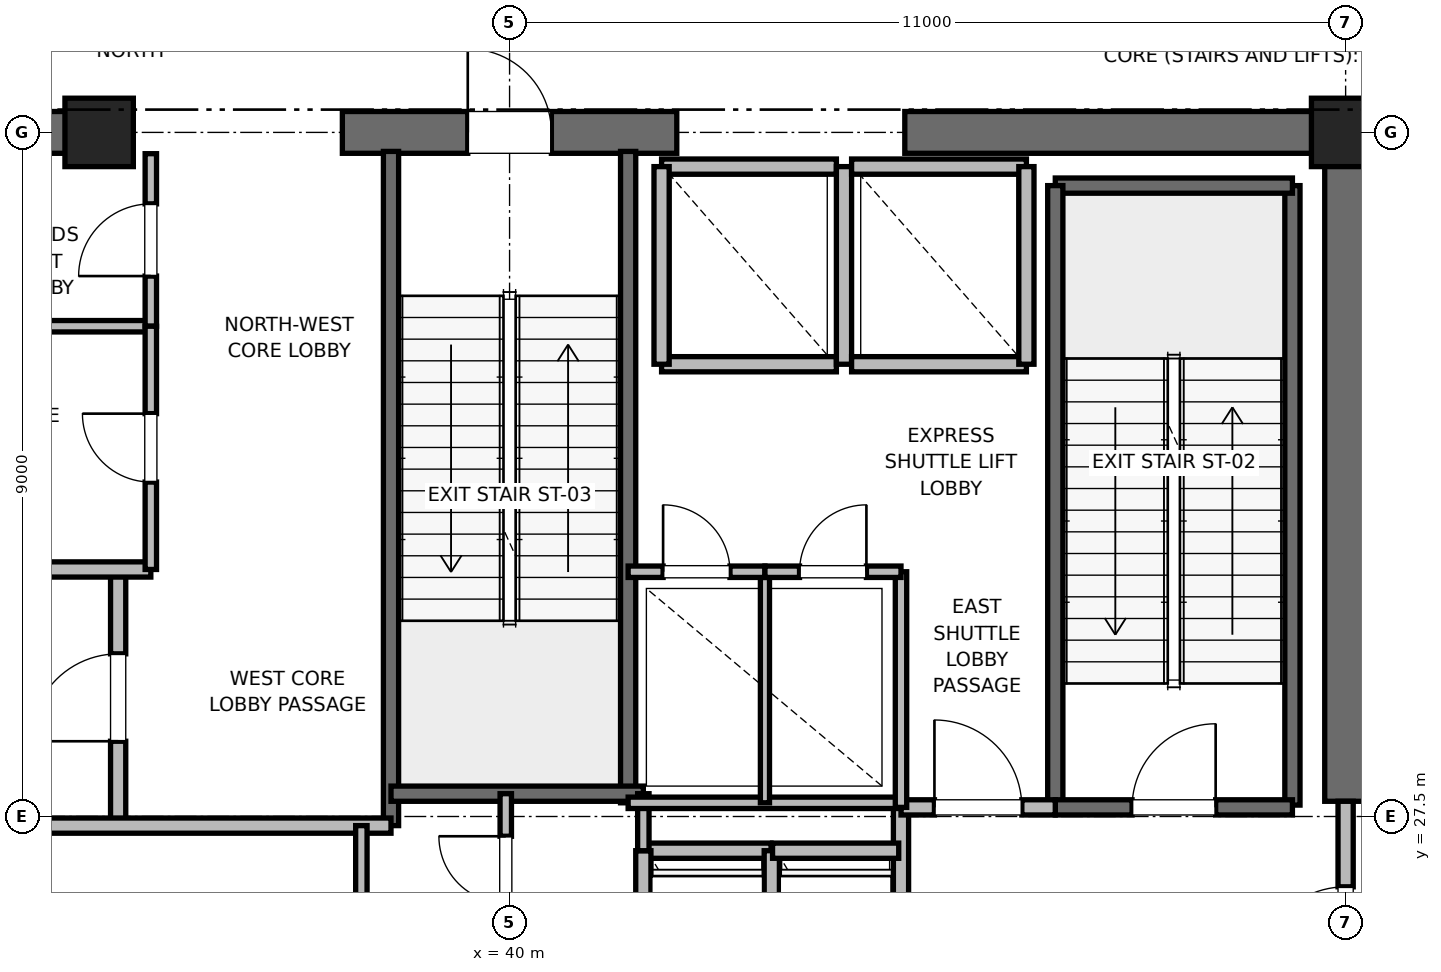
"""IFC4 building model, lengths in metres.
Left out: names, types, materials, properties, quantities, classifications, styles, units other than length and angle.
Written with IfcOpenShell. Run it as: python <this file> out.ifc"""

import sys

from ifc_helpers import new_model, si_unit, direction, frame, frame_2d, origin, origin_2d, place, context, subcontext, project, spatial, rectangle, extrude, element, fill, save


model = new_model("IFC4")
c1 = context("Model", 3, precision=1e-05, world=origin(), true_north=direction((0.0, 1.0)))
c2 = subcontext(c1, "Body", "Model", "MODEL_VIEW")
j1 = project(units=[si_unit("LENGTHUNIT", "METRE"), si_unit("PLANEANGLEUNIT", "RADIAN")], contexts=[c1])
p1 = place(None, origin())
s1 = spatial("IfcSite", under=j1, at=p1, CompositionType="ELEMENT")
p2 = place(p1, origin())
s2 = spatial("IfcBuilding", under=s1, at=p2, CompositionType="ELEMENT")
p3 = place(p2, frame((0.0, 0.0, 189.4)))
s3 = spatial("IfcBuildingStorey", under=s2, at=p3, CompositionType="ELEMENT", Elevation=189.4)
for number, where, z_axis, x_axis in (
    (1, (51.0, 36.5, 0.0), (0.0, 0.0, 1.0), (1.0, 0.0, 0.0)),
    (2, (34.6, 36.5, 0.0), (0.0, 0.0, 1.0), (1.0, 0.0, 0.0)),
):
    element("IfcColumn", number, at=place(p3, frame(where, z_axis=z_axis, x_axis=x_axis)), inside=s3, PredefinedType="PILASTER", context=c2, shape_type="SweptSolid", body=[
        extrude(rectangle(XDim=0.9, YDim=0.9, at=origin_2d()), origin(), (0.0, 0.0, 1.0), 5.4),
    ])
p4 = place(p3, frame((29.0, 36.5, 0.0), z_axis=(0.0, 0.0, 1.0), x_axis=(1.0, 0.0, 0.0)))
e3 = element("IfcWall", 3, at=p4, inside=s3, PredefinedType="SHEAR", context=c2, shape_type="SweptSolid", body=[
    extrude(rectangle(XDim=5.8, YDim=0.55, at=frame_2d((2.9, 0.0))), origin(), (0.0, 0.0, 1.0), 5.1),
])
p5 = place(p3, frame((37.8, 36.5, 0.0), z_axis=(0.0, 0.0, 1.0), x_axis=(1.0, 0.0, 0.0)))
e4 = element("IfcWall", 4, at=p5, inside=s3, PredefinedType="SHEAR", context=c2, shape_type="SweptSolid", body=[
    extrude(rectangle(XDim=4.4, YDim=0.55, at=frame_2d((2.2, 0.0))), origin(), (0.0, 0.0, 1.0), 5.1),
])
p6 = place(p5, frame((1.65, 0.0, 0.0)))
e5 = element("IfcOpeningElement", 5, at=p6, cuts=e4, PredefinedType="OPENING", context=c2, shape_type="SweptSolid", body=[
    extrude(rectangle(XDim=1.1, YDim=2.15, at=frame_2d((0.55, 1.075))), frame((0.0, 0.275, 0.0), z_axis=(0.0, -1.0, 0.0), x_axis=(1.0, 0.0, 0.0)), (0.0, 0.0, 1.0), 0.55),
])
p7 = place(p3, frame((45.2, 36.5, 0.0), z_axis=(0.0, 0.0, 1.0), x_axis=(1.0, 0.0, 0.0)))
e6 = element("IfcWall", 6, at=p7, inside=s3, PredefinedType="SHEAR", context=c2, shape_type="SweptSolid", body=[
    extrude(rectangle(XDim=5.8, YDim=0.55, at=frame_2d((2.9, 0.0))), origin(), (0.0, 0.0, 1.0), 5.1),
])
p8 = place(p3, frame((51.0, 27.7, 0.0), z_axis=(0.0, 0.0, 1.0), x_axis=(0.0, 1.0, 0.0)))
e7 = element("IfcWall", 7, at=p8, inside=s3, PredefinedType="SHEAR", context=c2, shape_type="SweptSolid", body=[
    extrude(rectangle(XDim=8.8, YDim=0.55, at=frame_2d((4.4, 0.0))), origin(), (0.0, 0.0, 1.0), 5.1),
])
p9 = place(p3, frame((50.3, 27.65, 0.0), z_axis=(0.0, 0.0, 1.0), x_axis=(0.0, 1.0, 0.0)))
e8 = element("IfcWall", 8, at=p9, inside=s3, PredefinedType="SOLIDWALL", context=c2, shape_type="SweptSolid", body=[
    extrude(rectangle(XDim=8.15, YDim=0.2, at=frame_2d((4.075, 0.0))), origin(), (0.0, 0.0, 1.0), 5.1),
])
p10 = place(p3, frame((47.18, 35.8, 0.0), z_axis=(0.0, 0.0, 1.0), x_axis=(1.0, 0.0, 0.0)))
e9 = element("IfcWall", 9, at=p10, inside=s3, PredefinedType="SOLIDWALL", context=c2, shape_type="SweptSolid", body=[
    extrude(rectangle(XDim=3.12, YDim=0.2, at=frame_2d((1.56, 0.0))), origin(), (0.0, 0.0, 1.0), 5.1),
])
p11 = place(p3, frame((47.18, 27.62, 0.0), z_axis=(0.0, 0.0, 1.0), x_axis=(0.0, 1.0, 0.0)))
e10 = element("IfcWall", 10, at=p11, inside=s3, PredefinedType="SOLIDWALL", context=c2, shape_type="SweptSolid", body=[
    extrude(rectangle(XDim=8.18, YDim=0.2, at=frame_2d((4.09, 0.0))), origin(), (0.0, 0.0, 1.0), 5.1),
])
p12 = place(p3, frame((47.18, 27.62, 0.0), z_axis=(0.0, 0.0, 1.0), x_axis=(1.0, 0.0, 0.0)))
e11 = element("IfcWall", 11, at=p12, inside=s3, PredefinedType="SOLIDWALL", context=c2, shape_type="SweptSolid", body=[
    extrude(rectangle(XDim=3.12, YDim=0.2, at=frame_2d((1.56, 0.0))), origin(), (0.0, 0.0, 1.0), 5.1),
])
p13 = place(p12, frame((1.01, 0.0, 0.0)))
e12 = element("IfcOpeningElement", 12, at=p13, cuts=e11, PredefinedType="OPENING", context=c2, shape_type="SweptSolid", body=[
    extrude(rectangle(XDim=1.1, YDim=2.15, at=frame_2d((0.55, 1.075))), frame((0.0, 0.1, 0.0), z_axis=(0.0, -1.0, 0.0), x_axis=(1.0, 0.0, 0.0)), (0.0, 0.0, 1.0), 0.2),
])
p14 = place(p3, frame((38.44, 27.38, 0.0), z_axis=(0.0, 0.0, 1.0), x_axis=(0.0, 1.0, 0.0)))
e13 = element("IfcWall", 13, at=p14, inside=s3, PredefinedType="SOLIDWALL", context=c2, shape_type="SweptSolid", body=[
    extrude(rectangle(XDim=8.87, YDim=0.2, at=frame_2d((4.435, 0.0))), origin(), (0.0, 0.0, 1.0), 5.1),
])
p15 = place(p3, frame((41.56, 27.68, 0.0), z_axis=(0.0, 0.0, 1.0), x_axis=(0.0, 1.0, 0.0)))
e14 = element("IfcWall", 14, at=p15, inside=s3, PredefinedType="SOLIDWALL", context=c2, shape_type="SweptSolid", body=[
    extrude(rectangle(XDim=8.57, YDim=0.2, at=frame_2d((4.285, 0.0))), origin(), (0.0, 0.0, 1.0), 5.1),
])
p16 = place(p3, frame((38.44, 27.8, 0.0), z_axis=(0.0, 0.0, 1.0), x_axis=(1.0, 0.0, 0.0)))
e15 = element("IfcWall", 15, at=p16, inside=s3, PredefinedType="SOLIDWALL", context=c2, shape_type="SweptSolid", body=[
    extrude(rectangle(XDim=3.32, YDim=0.2, at=frame_2d((1.66, 0.0))), origin(), (0.0, 0.0, 1.0), 5.1),
])
p17 = place(p3, frame((34.85, 27.38, 0.0), z_axis=(0.0, 0.0, 1.0), x_axis=(0.0, 1.0, 0.0)))
e16 = element("IfcWall", 16, at=p17, inside=s3, PredefinedType="PARTITIONING", context=c2, shape_type="SweptSolid", body=[
    extrude(rectangle(XDim=3.37, YDim=0.2, at=frame_2d((1.685, 0.0))), origin(), (0.0, 0.0, 1.0), 5.1),
])
p18 = place(p17, frame((1.11, 0.0, 0.0)))
e17 = element("IfcOpeningElement", 17, at=p18, cuts=e16, PredefinedType="OPENING", context=c2, shape_type="SweptSolid", body=[
    extrude(rectangle(XDim=1.15, YDim=2.2, at=frame_2d((0.575, 1.1))), frame((0.0, 0.1, 0.0), z_axis=(0.0, -1.0, 0.0), x_axis=(1.0, 0.0, 0.0)), (0.0, 0.0, 1.0), 0.2),
])
p19 = place(p3, frame((32.82, 27.38, 0.0), z_axis=(0.0, 0.0, 1.0), x_axis=(1.0, 0.0, 0.0)))
e18 = element("IfcWall", 18, at=p19, inside=s3, PredefinedType="PARTITIONING", context=c2, shape_type="SweptSolid", body=[
    extrude(rectangle(XDim=5.62, YDim=0.2, at=frame_2d((2.81, 0.0))), origin(), (0.0, 0.0, 1.0), 5.1),
])
p20 = place(p3, frame((32.15, 30.75, 0.0), z_axis=(0.0, 0.0, 1.0), x_axis=(1.0, 0.0, 0.0)))
e19 = element("IfcWall", 19, at=p20, inside=s3, PredefinedType="PARTITIONING", context=c2, shape_type="SweptSolid", body=[
    extrude(rectangle(XDim=3.13, YDim=0.2, at=frame_2d((1.565, 0.0))), origin(), (0.0, 0.0, 1.0), 5.1),
])
p21 = place(p3, frame((45.15, 24.25, 0.0), z_axis=(0.0, 0.0, 1.0), x_axis=(0.0, 1.0, 0.0)))
e20 = element("IfcWall", 20, at=p21, inside=s3, PredefinedType="PARTITIONING", context=c2, shape_type="SweptSolid", body=[
    extrude(rectangle(XDim=3.37, YDim=0.2, at=frame_2d((1.685, 0.0))), origin(), (0.0, 0.0, 1.0), 5.1),
])
p22 = place(p3, frame((45.15, 27.62, 0.0), z_axis=(0.0, 0.0, 1.0), x_axis=(1.0, 0.0, 0.0)))
e21 = element("IfcWall", 21, at=p22, inside=s3, PredefinedType="PARTITIONING", context=c2, shape_type="SweptSolid", body=[
    extrude(rectangle(XDim=2.03, YDim=0.2, at=frame_2d((1.015, 0.0))), origin(), (0.0, 0.0, 1.0), 5.1),
])
p23 = place(p22, frame((0.44, 0.0, 0.0)))
e22 = element("IfcOpeningElement", 22, at=p23, cuts=e21, PredefinedType="OPENING", context=c2, shape_type="SweptSolid", body=[
    extrude(rectangle(XDim=1.15, YDim=2.2, at=frame_2d((0.575, 1.1))), frame((0.0, 0.1, 0.0), z_axis=(0.0, -1.0, 0.0), x_axis=(1.0, 0.0, 0.0)), (0.0, 0.0, 1.0), 0.2),
])
p24 = place(p3, frame((51.0, 24.3, 0.0), z_axis=(0.0, 0.0, 1.0), x_axis=(0.0, 1.0, 0.0)))
e23 = element("IfcWall", 23, at=p24, inside=s3, PredefinedType="PARTITIONING", context=c2, shape_type="SweptSolid", body=[
    extrude(rectangle(XDim=3.4, YDim=0.2, at=frame_2d((1.7, 0.0))), origin(), (0.0, 0.0, 1.0), 4.08),
])
p25 = place(p24, frame((1.125, 0.0, 0.0)))
e24 = element("IfcOpeningElement", 24, at=p25, cuts=e23, PredefinedType="OPENING", context=c2, shape_type="SweptSolid", body=[
    extrude(rectangle(XDim=1.15, YDim=2.2, at=frame_2d((0.575, 1.1))), frame((0.0, 0.1, 0.0), z_axis=(0.0, -1.0, 0.0), x_axis=(1.0, 0.0, 0.0)), (0.0, 0.0, 1.0), 0.2),
])
p26 = place(p3, frame((43.44, 27.05, 0.0), z_axis=(0.0, 0.0, 1.0), x_axis=(-1.0, 0.0, 0.0)))
e25 = element("IfcWall", 25, at=p26, inside=s3, PredefinedType="SOLIDWALL", context=c2, shape_type="SweptSolid", body=[
    extrude(rectangle(XDim=1.68, YDim=0.2, at=frame_2d((0.84, 0.0))), origin(), (0.0, 0.0, 1.0), 5.1),
])
for number, where, z_axis, x_axis in (
    (26, (41.76, 27.05, 0.0), (0.0, 0.0, 1.0), (0.0, -1.0, 0.0)),
    (27, (43.45, 24.45, 0.0), (0.0, 0.0, 1.0), (0.0, 1.0, 0.0)),
):
    element("IfcWall", number, at=place(p3, frame(where, z_axis=z_axis, x_axis=x_axis)), inside=s3, PredefinedType="SOLIDWALL", context=c2, shape_type="SweptSolid", body=[
        extrude(rectangle(XDim=2.6, YDim=0.2, at=frame_2d((1.3, 0.0))), origin(), (0.0, 0.0, 1.0), 5.1),
    ])
p27 = place(p3, frame((45.12, 27.05, 0.0), z_axis=(0.0, 0.0, 1.0), x_axis=(-1.0, 0.0, 0.0)))
e28 = element("IfcWall", 28, at=p27, inside=s3, PredefinedType="SOLIDWALL", context=c2, shape_type="SweptSolid", body=[
    extrude(rectangle(XDim=1.66, YDim=0.2, at=frame_2d((0.83, 0.0))), origin(), (0.0, 0.0, 1.0), 5.1),
])
p28 = place(p3, frame((42.0, 33.45, 0.0), z_axis=(0.0, 0.0, 1.0), x_axis=(1.0, 0.0, 0.0)))
e29 = element("IfcWall", 29, at=p28, inside=s3, PredefinedType="SOLIDWALL", context=c2, shape_type="SweptSolid", body=[
    extrude(rectangle(XDim=2.3, YDim=0.2, at=frame_2d((1.15, 0.0))), origin(), (0.0, 0.0, 1.0), 5.1),
])
p29 = place(p3, frame((44.3, 36.05, 0.0), z_axis=(0.0, 0.0, 1.0), x_axis=(-1.0, 0.0, 0.0)))
e30 = element("IfcWall", 30, at=p29, inside=s3, PredefinedType="SOLIDWALL", context=c2, shape_type="SweptSolid", body=[
    extrude(rectangle(XDim=2.3, YDim=0.2, at=frame_2d((1.15, 0.0))), origin(), (0.0, 0.0, 1.0), 4.08),
])
for number, where, z_axis, x_axis in (
    (31, (42.0, 36.05, 0.0), (0.0, 0.0, 1.0), (0.0, -1.0, 0.0)),
    (32, (44.4, 33.45, 0.0), (0.0, 0.0, 1.0), (0.0, 1.0, 0.0)),
):
    element("IfcWall", number, at=place(p3, frame(where, z_axis=z_axis, x_axis=x_axis)), inside=s3, PredefinedType="SOLIDWALL", context=c2, shape_type="SweptSolid", body=[
        extrude(rectangle(XDim=2.6, YDim=0.2, at=frame_2d((1.3, 0.0))), origin(), (0.0, 0.0, 1.0), 4.08),
    ])
p30 = place(p3, frame((44.5, 33.45, 0.0), z_axis=(0.0, 0.0, 1.0), x_axis=(1.0, 0.0, 0.0)))
e33 = element("IfcWall", 33, at=p30, inside=s3, PredefinedType="SOLIDWALL", context=c2, shape_type="SweptSolid", body=[
    extrude(rectangle(XDim=2.3, YDim=0.2, at=frame_2d((1.15, 0.0))), origin(), (0.0, 0.0, 1.0), 5.1),
])
p31 = place(p3, frame((46.8, 36.05, 0.0), z_axis=(0.0, 0.0, 1.0), x_axis=(-1.0, 0.0, 0.0)))
e34 = element("IfcWall", 34, at=p31, inside=s3, PredefinedType="SOLIDWALL", context=c2, shape_type="SweptSolid", body=[
    extrude(rectangle(XDim=2.3, YDim=0.2, at=frame_2d((1.15, 0.0))), origin(), (0.0, 0.0, 1.0), 4.08),
])
p32 = place(p3, frame((46.8, 33.45, 0.0), z_axis=(0.0, 0.0, 1.0), x_axis=(0.0, 1.0, 0.0)))
e35 = element("IfcWall", 35, at=p32, inside=s3, PredefinedType="SOLIDWALL", context=c2, shape_type="SweptSolid", body=[
    extrude(rectangle(XDim=2.6, YDim=0.2, at=frame_2d((1.3, 0.0))), origin(), (0.0, 0.0, 1.0), 5.1),
])
p33 = place(p3, frame((41.76, 27.05, 0.0), z_axis=(0.0, 0.0, 1.0), x_axis=(0.0, 1.0, 0.0)))
e36 = element("IfcWall", 36, at=p33, inside=s3, PredefinedType="PARTITIONING", context=c2, shape_type="SweptSolid", body=[
    extrude(rectangle(XDim=0.75, YDim=0.15, at=frame_2d((0.375, 0.0))), origin(), (0.0, 0.0, 1.0), 2.85),
])
p34 = place(p3, frame((39.95, 25.8, 0.0), z_axis=(0.0, 0.0, 1.0), x_axis=(0.0, 1.0, 0.0)))
e37 = element("IfcWall", 37, at=p34, inside=s3, PredefinedType="PARTITIONING", context=c2, shape_type="SweptSolid", body=[
    extrude(rectangle(XDim=2.0, YDim=0.15, at=frame_2d((1.0, 0.0))), origin(), (0.0, 0.0, 1.0), 2.85),
])
p35 = place(p34, frame((0.56, 0.0, 0.0)))
e38 = element("IfcOpeningElement", 38, at=p35, cuts=e37, PredefinedType="OPENING", context=c2, shape_type="SweptSolid", body=[
    extrude(rectangle(XDim=0.88, YDim=2.1, at=frame_2d((0.44, 1.05))), frame((0.0, 0.075, 0.0), z_axis=(0.0, -1.0, 0.0), x_axis=(1.0, 0.0, 0.0)), (0.0, 0.0, 1.0), 0.15),
])
p36 = place(p3, frame((32.15, 33.95, 0.0), z_axis=(0.0, 0.0, 1.0), x_axis=(1.0, 0.0, 0.0)))
e39 = element("IfcWall", 39, at=p36, inside=s3, PredefinedType="PARTITIONING", context=c2, shape_type="SweptSolid", body=[
    extrude(rectangle(XDim=3.13, YDim=0.15, at=frame_2d((1.565, 0.0))), origin(), (0.0, 0.0, 1.0), 2.85),
])
p37 = place(p3, frame((35.28, 33.95, 0.0), z_axis=(0.0, 0.0, 1.0), x_axis=(0.0, 1.0, 0.0)))
e40 = element("IfcWall", 40, at=p37, inside=s3, PredefinedType="PARTITIONING", context=c2, shape_type="SweptSolid", body=[
    extrude(rectangle(XDim=2.27, YDim=0.15, at=frame_2d((1.135, 0.0))), origin(), (0.0, 0.0, 1.0), 2.85),
])
p38 = place(p37, frame((0.66, 0.0, 0.0)))
e41 = element("IfcOpeningElement", 41, at=p38, cuts=e40, PredefinedType="OPENING", context=c2, shape_type="SweptSolid", body=[
    extrude(rectangle(XDim=0.95, YDim=2.15, at=frame_2d((0.475, 1.075))), frame((0.0, 0.075, 0.0), z_axis=(0.0, -1.0, 0.0), x_axis=(1.0, 0.0, 0.0)), (0.0, 0.0, 1.0), 0.15),
])
p39 = place(p3, frame((35.28, 30.75, 0.0), z_axis=(0.0, 0.0, 1.0), x_axis=(0.0, 1.0, 0.0)))
e42 = element("IfcWall", 42, at=p39, inside=s3, PredefinedType="PARTITIONING", context=c2, shape_type="SweptSolid", body=[
    extrude(rectangle(XDim=3.2, YDim=0.15, at=frame_2d((1.6, 0.0))), origin(), (0.0, 0.0, 1.0), 2.85),
])
p40 = place(p39, frame((1.15, 0.0, 0.0)))
e43 = element("IfcOpeningElement", 43, at=p40, cuts=e42, PredefinedType="OPENING", context=c2, shape_type="SweptSolid", body=[
    extrude(rectangle(XDim=0.9, YDim=2.1, at=frame_2d((0.45, 1.05))), frame((0.0, 0.075, 0.0), z_axis=(0.0, -1.0, 0.0), x_axis=(1.0, 0.0, 0.0)), (0.0, 0.0, 1.0), 0.15),
])
p41 = place(p3, frame((38.05, 23.06, 0.0), z_axis=(0.0, 0.0, 1.0), x_axis=(0.0, 1.0, 0.0)))
e44 = element("IfcWall", 44, at=p41, inside=s3, PredefinedType="PARTITIONING", context=c2, shape_type="SweptSolid", body=[
    extrude(rectangle(XDim=4.32, YDim=0.15, at=frame_2d((2.16, 0.0))), origin(), (0.0, 0.0, 1.0), 2.85),
])
p42 = place(p41, frame((1.72, 0.0, 0.0)))
e45 = element("IfcOpeningElement", 45, at=p42, cuts=e44, PredefinedType="OPENING", context=c2, shape_type="SweptSolid", body=[
    extrude(rectangle(XDim=0.88, YDim=2.1, at=frame_2d((0.44, 1.05))), frame((0.0, 0.075, 0.0), z_axis=(0.0, -1.0, 0.0), x_axis=(1.0, 0.0, 0.0)), (0.0, 0.0, 1.0), 0.15),
])
p43 = place(p3, frame((41.56, 27.68, 0.0), z_axis=(0.0, 0.0, 1.0), x_axis=(1.0, 0.0, 0.0)))
e46 = element("IfcWall", 46, at=p43, inside=s3, PredefinedType="PARTITIONING", context=c2, shape_type="SweptSolid", body=[
    extrude(rectangle(XDim=3.59, YDim=0.15, at=frame_2d((1.795, 0.0))), origin(), (0.0, 0.0, 1.0), 2.85),
])
p44 = place(p3, frame((45.15, 27.62, 0.0), z_axis=(0.0, 0.0, 1.0), x_axis=(0.0, 1.0, 0.0)))
e47 = element("IfcWall", 47, at=p44, inside=s3, PredefinedType="PARTITIONING", context=c2, shape_type="SweptSolid", body=[
    extrude(rectangle(XDim=3.1, YDim=0.15, at=frame_2d((1.55, 0.0))), origin(), (0.0, 0.0, 1.0), 2.85),
])
p45 = place(p3, frame((43.36, 27.68, 0.0), z_axis=(0.0, 0.0, 1.0), x_axis=(0.0, 1.0, 0.0)))
e48 = element("IfcWall", 48, at=p45, inside=s3, PredefinedType="PARTITIONING", context=c2, shape_type="SweptSolid", body=[
    extrude(rectangle(XDim=3.04, YDim=0.12, at=frame_2d((1.52, 0.0))), origin(), (0.0, 0.0, 1.0), 2.85),
])
p46 = place(p3, frame((41.56, 30.72, 0.0), z_axis=(0.0, 0.0, 1.0), x_axis=(1.0, 0.0, 0.0)))
e49 = element("IfcWall", 49, at=p46, inside=s3, PredefinedType="PARTITIONING", context=c2, shape_type="SweptSolid", body=[
    extrude(rectangle(XDim=1.8, YDim=0.15, at=frame_2d((0.9, 0.0))), origin(), (0.0, 0.0, 1.0), 2.85),
])
p47 = place(p46, frame((0.46, 0.0, 0.0)))
e50 = element("IfcOpeningElement", 50, at=p47, cuts=e49, PredefinedType="OPENING", context=c2, shape_type="SweptSolid", body=[
    extrude(rectangle(XDim=0.88, YDim=2.1, at=frame_2d((0.44, 1.05))), frame((0.0, 0.075, 0.0), z_axis=(0.0, -1.0, 0.0), x_axis=(1.0, 0.0, 0.0)), (0.0, 0.0, 1.0), 0.15),
])
p48 = place(p3, frame((43.36, 30.72, 0.0), z_axis=(0.0, 0.0, 1.0), x_axis=(1.0, 0.0, 0.0)))
e51 = element("IfcWall", 51, at=p48, inside=s3, PredefinedType="PARTITIONING", context=c2, shape_type="SweptSolid", body=[
    extrude(rectangle(XDim=1.79, YDim=0.15, at=frame_2d((0.895, 0.0))), origin(), (0.0, 0.0, 1.0), 2.85),
])
p49 = place(p48, frame((0.455, 0.0, 0.0)))
e52 = element("IfcOpeningElement", 52, at=p49, cuts=e51, PredefinedType="OPENING", context=c2, shape_type="SweptSolid", body=[
    extrude(rectangle(XDim=0.88, YDim=2.1, at=frame_2d((0.44, 1.05))), frame((0.0, 0.075, 0.0), z_axis=(0.0, -1.0, 0.0), x_axis=(1.0, 0.0, 0.0)), (0.0, 0.0, 1.0), 0.15),
])
p50 = place(p13, origin())
e53 = element("IfcDoor", 53, at=p50, inside=s3, OperationType="SINGLE_SWING_RIGHT", PredefinedType="DOOR", context=c2, shape_type="SweptSolid", body=[
    extrude(rectangle(XDim=1.1, YDim=2.15, at=frame_2d((0.55, 1.075))), frame((0.0, 0.025, 0.0), z_axis=(0.0, -1.0, 0.0), x_axis=(1.0, 0.0, 0.0)), (0.0, 0.0, 1.0), 0.05),
])
fill(e12, e53)
p51 = place(p6, origin())
e54 = element("IfcDoor", 54, at=p51, inside=s3, OperationType="SINGLE_SWING_LEFT", PredefinedType="DOOR", context=c2, shape_type="SweptSolid", body=[
    extrude(rectangle(XDim=1.1, YDim=2.15, at=frame_2d((0.55, 1.075))), frame((0.0, 0.025, 0.0), z_axis=(0.0, -1.0, 0.0), x_axis=(1.0, 0.0, 0.0)), (0.0, 0.0, 1.0), 0.05),
])
fill(e5, e54)
p52 = place(p18, origin())
e55 = element("IfcDoor", 55, at=p52, inside=s3, OperationType="SINGLE_SWING_LEFT", PredefinedType="DOOR", context=c2, shape_type="SweptSolid", body=[
    extrude(rectangle(XDim=1.15, YDim=2.2, at=frame_2d((0.575, 1.1))), frame((0.0, 0.025, 0.0), z_axis=(0.0, -1.0, 0.0), x_axis=(1.0, 0.0, 0.0)), (0.0, 0.0, 1.0), 0.05),
])
fill(e17, e55)
p53 = place(p23, origin())
e56 = element("IfcDoor", 56, at=p53, inside=s3, OperationType="SINGLE_SWING_LEFT", PredefinedType="DOOR", context=c2, shape_type="SweptSolid", body=[
    extrude(rectangle(XDim=1.15, YDim=2.2, at=frame_2d((0.575, 1.1))), frame((0.0, 0.025, 0.0), z_axis=(0.0, -1.0, 0.0), x_axis=(1.0, 0.0, 0.0)), (0.0, 0.0, 1.0), 0.05),
])
fill(e22, e56)
p54 = place(p25, origin())
e57 = element("IfcDoor", 57, at=p54, inside=s3, OperationType="SINGLE_SWING_LEFT", PredefinedType="DOOR", context=c2, shape_type="SweptSolid", body=[
    extrude(rectangle(XDim=1.15, YDim=2.2, at=frame_2d((0.575, 1.1))), frame((0.0, 0.025, 0.0), z_axis=(0.0, -1.0, 0.0), x_axis=(1.0, 0.0, 0.0)), (0.0, 0.0, 1.0), 0.05),
])
fill(e24, e57)
p55 = place(p35, origin())
e58 = element("IfcDoor", 58, at=p55, inside=s3, OperationType="SINGLE_SWING_RIGHT", PredefinedType="DOOR", context=c2, shape_type="SweptSolid", body=[
    extrude(rectangle(XDim=0.88, YDim=2.1, at=frame_2d((0.44, 1.05))), frame((0.0, 0.025, 0.0), z_axis=(0.0, -1.0, 0.0), x_axis=(1.0, 0.0, 0.0)), (0.0, 0.0, 1.0), 0.05),
])
fill(e38, e58)
p56 = place(p38, origin())
e59 = element("IfcDoor", 59, at=p56, inside=s3, OperationType="SINGLE_SWING_LEFT", PredefinedType="DOOR", context=c2, shape_type="SweptSolid", body=[
    extrude(rectangle(XDim=0.95, YDim=2.15, at=frame_2d((0.475, 1.075))), frame((0.0, 0.025, 0.0), z_axis=(0.0, -1.0, 0.0), x_axis=(1.0, 0.0, 0.0)), (0.0, 0.0, 1.0), 0.05),
])
fill(e41, e59)
p57 = place(p40, origin())
e60 = element("IfcDoor", 60, at=p57, inside=s3, OperationType="SINGLE_SWING_RIGHT", PredefinedType="DOOR", context=c2, shape_type="SweptSolid", body=[
    extrude(rectangle(XDim=0.9, YDim=2.1, at=frame_2d((0.45, 1.05))), frame((0.0, 0.025, 0.0), z_axis=(0.0, -1.0, 0.0), x_axis=(1.0, 0.0, 0.0)), (0.0, 0.0, 1.0), 0.05),
])
fill(e43, e60)
p58 = place(p47, origin())
e61 = element("IfcDoor", 61, at=p58, inside=s3, OperationType="SINGLE_SWING_LEFT", PredefinedType="DOOR", context=c2, shape_type="SweptSolid", body=[
    extrude(rectangle(XDim=0.88, YDim=2.1, at=frame_2d((0.44, 1.05))), frame((0.0, 0.025, 0.0), z_axis=(0.0, -1.0, 0.0), x_axis=(1.0, 0.0, 0.0)), (0.0, 0.0, 1.0), 0.05),
])
fill(e50, e61)
p59 = place(p49, origin())
e62 = element("IfcDoor", 62, at=p59, inside=s3, OperationType="SINGLE_SWING_RIGHT", PredefinedType="DOOR", context=c2, shape_type="SweptSolid", body=[
    extrude(rectangle(XDim=0.88, YDim=2.1, at=frame_2d((0.44, 1.05))), frame((0.0, 0.025, 0.0), z_axis=(0.0, -1.0, 0.0), x_axis=(1.0, 0.0, 0.0)), (0.0, 0.0, 1.0), 0.05),
])
fill(e52, e62)
save(model, sys.argv[1])
